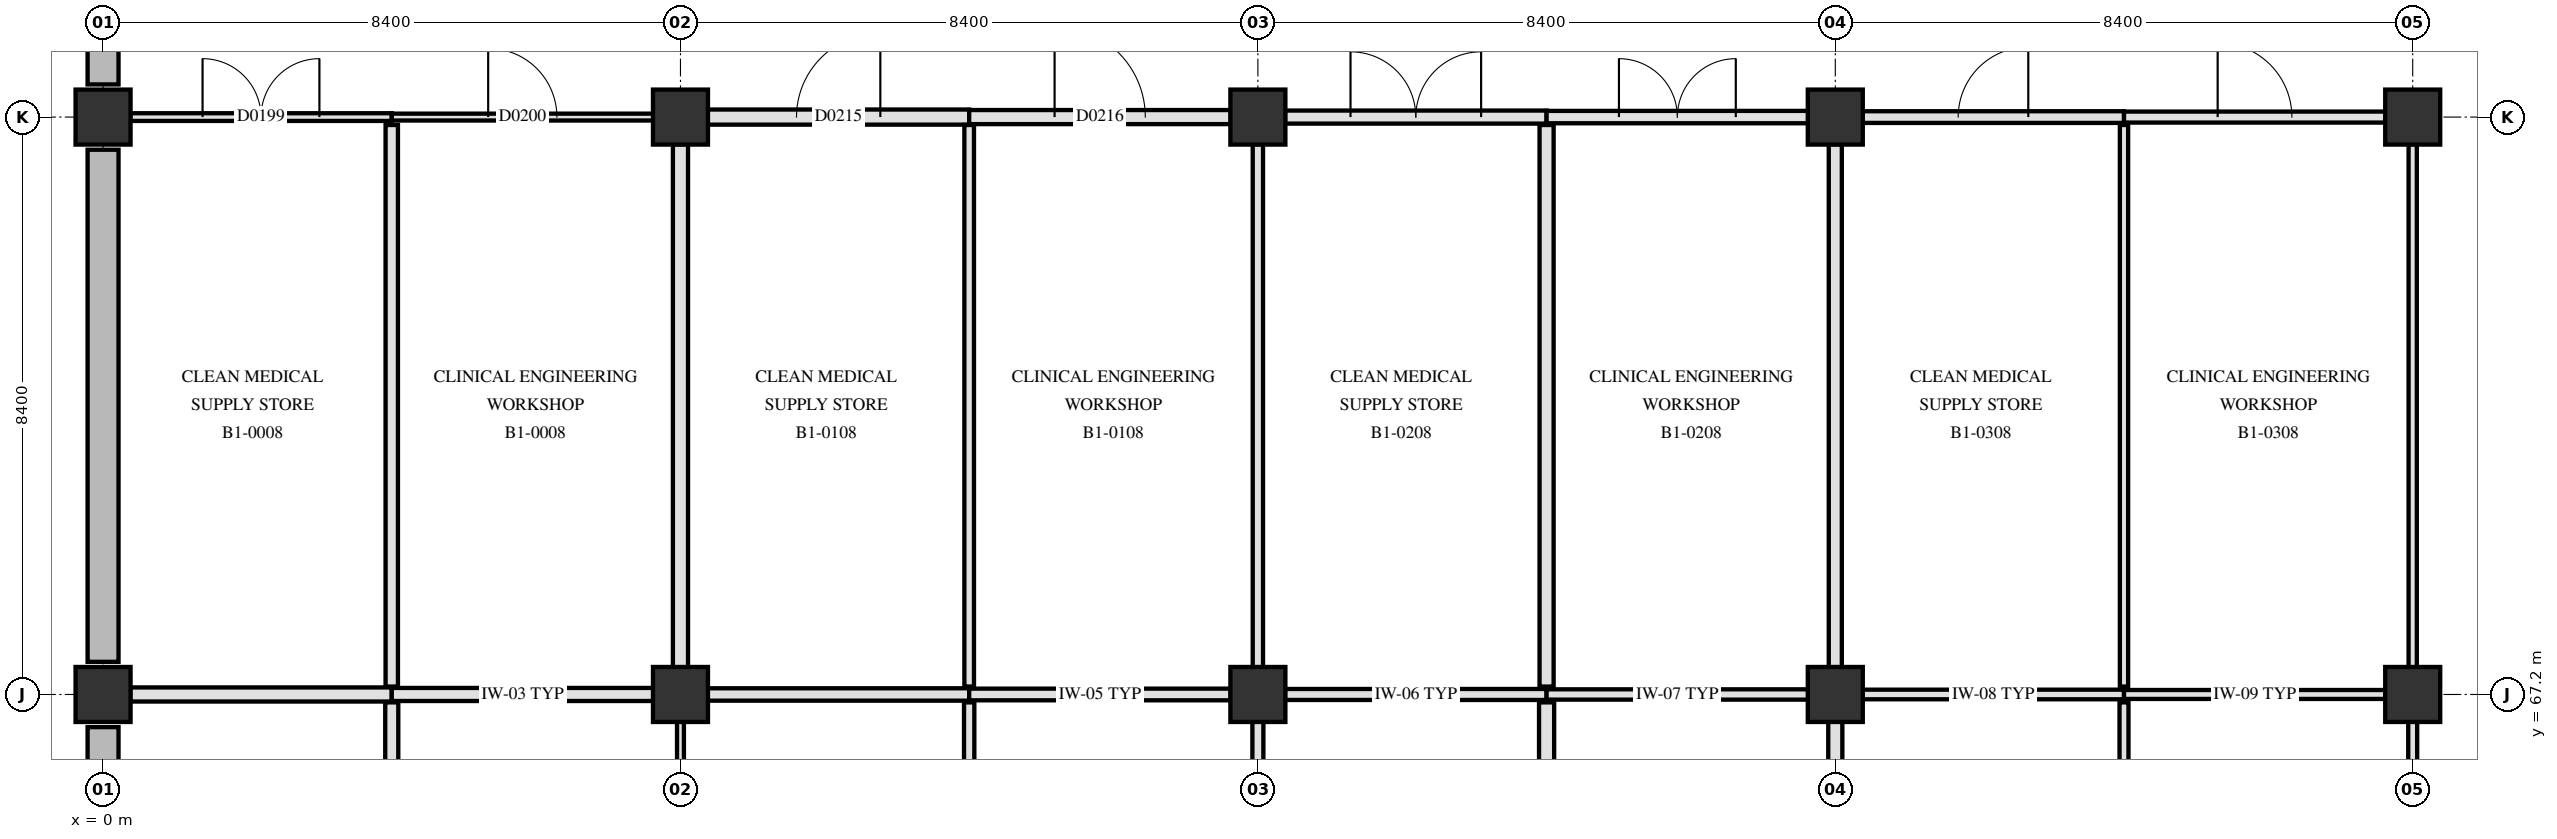
"""IFC4 building model, lengths in metres.
Left out: names, types, materials, properties, quantities, classifications, styles, units other than length and angle.
Written with IfcOpenShell. Run it as: python <this file> out.ifc"""

import sys

from ifc_helpers import new_model, si_unit, direction, frame, frame_2d, origin, origin_2d, place, context, subcontext, project, spatial, rectangle, extrude, element, fill, save


model = new_model("IFC4")
c1 = context("Model", 3, precision=1e-05, world=origin(), true_north=direction((0.0, 1.0)))
c2 = subcontext(c1, "Body", "Model", "MODEL_VIEW")
j1 = project(units=[si_unit("LENGTHUNIT", "METRE"), si_unit("PLANEANGLEUNIT", "RADIAN")], contexts=[c1])
p1 = place(None, origin())
s1 = spatial("IfcSite", under=j1, at=p1, CompositionType="ELEMENT")
p2 = place(p1, origin())
s2 = spatial("IfcBuilding", under=s1, at=p2, CompositionType="ELEMENT")
p3 = place(p2, frame((0.0, 0.0, -5.4)))
s3 = spatial("IfcBuildingStorey", under=s2, at=p3, CompositionType="ELEMENT", Elevation=-5.4)
for number, where, z_axis, x_axis in (
    (1, (0.0, 67.2, 0.0), (0.0, 0.0, 1.0), (1.0, 0.0, 0.0)),
    (2, (0.0, 75.6, 0.0), (0.0, 0.0, 1.0), (1.0, 0.0, 0.0)),
    (3, (8.4, 67.2, 0.0), (0.0, 0.0, 1.0), (1.0, 0.0, 0.0)),
    (4, (8.4, 75.6, 0.0), (0.0, 0.0, 1.0), (1.0, 0.0, 0.0)),
    (5, (16.8, 67.2, 0.0), (0.0, 0.0, 1.0), (1.0, 0.0, 0.0)),
    (6, (16.8, 75.6, 0.0), (0.0, 0.0, 1.0), (1.0, 0.0, 0.0)),
    (7, (25.2, 67.2, 0.0), (0.0, 0.0, 1.0), (1.0, 0.0, 0.0)),
    (8, (25.2, 75.6, 0.0), (0.0, 0.0, 1.0), (1.0, 0.0, 0.0)),
    (9, (33.6, 67.2, 0.0), (0.0, 0.0, 1.0), (1.0, 0.0, 0.0)),
    (10, (33.6, 75.6, 0.0), (0.0, 0.0, 1.0), (1.0, 0.0, 0.0)),
):
    element("IfcColumn", number, at=place(p3, frame(where, z_axis=z_axis, x_axis=x_axis)), inside=s3, PredefinedType="COLUMN", context=c2, shape_type="SweptSolid", body=[
        extrude(rectangle(XDim=0.8, YDim=0.8, at=origin_2d()), origin(), (0.0, 0.0, 1.0), 5.4),
    ])
p4 = place(p3, frame((0.0, 59.275, 0.0), z_axis=(0.0, 0.0, 1.0), x_axis=(0.0, 1.0, 0.0)))
e11 = element("IfcWall", 11, at=p4, inside=s3, PredefinedType="SOLIDWALL", context=c2, shape_type="SweptSolid", body=[
    extrude(rectangle(XDim=7.45, YDim=0.45, at=frame_2d((3.725, 0.0))), origin(), (0.0, 0.0, 1.0), 5.08),
])
for number, where, z_axis, x_axis in (
    (12, (0.0, 67.675, 0.0), (0.0, 0.0, 1.0), (0.0, 1.0, 0.0)),
    (13, (0.0, 76.075, 0.0), (0.0, 0.0, 1.0), (0.0, 1.0, 0.0)),
):
    element("IfcWall", number, at=place(p3, frame(where, z_axis=z_axis, x_axis=x_axis)), inside=s3, PredefinedType="SOLIDWALL", context=c2, shape_type="SweptSolid", body=[
        extrude(rectangle(XDim=7.45, YDim=0.45, at=frame_2d((3.725, 0.0))), origin(), (0.0, 0.0, 1.0), 5.08),
    ])
p5 = place(p3, frame((0.395, 67.2, 0.0), z_axis=(0.0, 0.0, 1.0), x_axis=(1.0, 0.0, 0.0)))
e14 = element("IfcWall", 14, at=p5, inside=s3, PredefinedType="PARTITIONING", context=c2, shape_type="SweptSolid", body=[
    extrude(rectangle(XDim=3.805, YDim=0.205, at=frame_2d((1.902, 0.0))), origin(), (0.0, 0.0, 1.0), 4.42),
])
p6 = place(p3, frame((4.2, 67.2, 0.0), z_axis=(0.0, 0.0, 1.0), x_axis=(1.0, 0.0, 0.0)))
e15 = element("IfcWall", 15, at=p6, inside=s3, PredefinedType="PARTITIONING", context=c2, shape_type="SweptSolid", body=[
    extrude(rectangle(XDim=3.805, YDim=0.19, at=frame_2d((1.902, 0.0))), origin(), (0.0, 0.0, 1.0), 4.42),
])
p7 = place(p3, frame((8.795, 67.2, 0.0), z_axis=(0.0, 0.0, 1.0), x_axis=(1.0, 0.0, 0.0)))
e16 = element("IfcWall", 16, at=p7, inside=s3, PredefinedType="PARTITIONING", context=c2, shape_type="SweptSolid", body=[
    extrude(rectangle(XDim=3.805, YDim=0.18, at=frame_2d((1.903, 0.0))), origin(), (0.0, 0.0, 1.0), 4.42),
])
p8 = place(p3, frame((12.6, 67.2, 0.0), z_axis=(0.0, 0.0, 1.0), x_axis=(1.0, 0.0, 0.0)))
e17 = element("IfcWall", 17, at=p8, inside=s3, PredefinedType="PARTITIONING", context=c2, shape_type="SweptSolid", body=[
    extrude(rectangle(XDim=3.805, YDim=0.17, at=frame_2d((1.902, 0.0))), origin(), (0.0, 0.0, 1.0), 4.42),
])
p9 = place(p3, frame((17.195, 67.2, 0.0), z_axis=(0.0, 0.0, 1.0), x_axis=(1.0, 0.0, 0.0)))
e18 = element("IfcWall", 18, at=p9, inside=s3, PredefinedType="PARTITIONING", context=c2, shape_type="SweptSolid", body=[
    extrude(rectangle(XDim=3.805, YDim=0.16, at=frame_2d((1.902, 0.0))), origin(), (0.0, 0.0, 1.0), 4.42),
])
p10 = place(p3, frame((21.0, 67.2, 0.0), z_axis=(0.0, 0.0, 1.0), x_axis=(1.0, 0.0, 0.0)))
e19 = element("IfcWall", 19, at=p10, inside=s3, PredefinedType="PARTITIONING", context=c2, shape_type="SweptSolid", body=[
    extrude(rectangle(XDim=3.805, YDim=0.15, at=frame_2d((1.902, 0.0))), origin(), (0.0, 0.0, 1.0), 4.42),
])
p11 = place(p3, frame((25.595, 67.2, 0.0), z_axis=(0.0, 0.0, 1.0), x_axis=(1.0, 0.0, 0.0)))
e20 = element("IfcWall", 20, at=p11, inside=s3, PredefinedType="PARTITIONING", context=c2, shape_type="SweptSolid", body=[
    extrude(rectangle(XDim=3.805, YDim=0.14, at=frame_2d((1.902, 0.0))), origin(), (0.0, 0.0, 1.0), 4.42),
])
p12 = place(p3, frame((29.4, 67.2, 0.0), z_axis=(0.0, 0.0, 1.0), x_axis=(1.0, 0.0, 0.0)))
e21 = element("IfcWall", 21, at=p12, inside=s3, PredefinedType="PARTITIONING", context=c2, shape_type="SweptSolid", body=[
    extrude(rectangle(XDim=3.805, YDim=0.13, at=frame_2d((1.903, 0.0))), origin(), (0.0, 0.0, 1.0), 4.42),
])
p13 = place(p3, frame((0.395, 75.6, 0.0), z_axis=(0.0, 0.0, 1.0), x_axis=(1.0, 0.0, 0.0)))
e22 = element("IfcWall", 22, at=p13, inside=s3, PredefinedType="PARTITIONING", context=c2, shape_type="SweptSolid", body=[
    extrude(rectangle(XDim=3.805, YDim=0.112, at=frame_2d((1.902, 0.0))), origin(), (0.0, 0.0, 1.0), 4.42),
])
p14 = place(p13, frame((1.052, 0.0, 0.0)))
e23 = element("IfcOpeningElement", 23, at=p14, cuts=e22, PredefinedType="OPENING", context=c2, shape_type="SweptSolid", body=[
    extrude(rectangle(XDim=1.7, YDim=2.25, at=frame_2d((0.85, 1.125))), frame((0.0, 0.066, 0.0), z_axis=(0.0, -1.0, 0.0), x_axis=(1.0, 0.0, 0.0)), (0.0, 0.0, 1.0), 0.132),
])
p15 = place(p3, frame((4.2, 75.6, 0.0), z_axis=(0.0, 0.0, 1.0), x_axis=(1.0, 0.0, 0.0)))
e24 = element("IfcWall", 24, at=p15, inside=s3, PredefinedType="PARTITIONING", context=c2, shape_type="SweptSolid", body=[
    extrude(rectangle(XDim=3.805, YDim=0.1, at=frame_2d((1.902, 0.0))), origin(), (0.0, 0.0, 1.0), 4.42),
])
p16 = place(p15, frame((1.403, 0.0, 0.0)))
e25 = element("IfcOpeningElement", 25, at=p16, cuts=e24, PredefinedType="OPENING", context=c2, shape_type="SweptSolid", body=[
    extrude(rectangle(XDim=1.0, YDim=2.15, at=frame_2d((0.5, 1.075))), frame((0.0, 0.06, 0.0), z_axis=(0.0, -1.0, 0.0), x_axis=(1.0, 0.0, 0.0)), (0.0, 0.0, 1.0), 0.12),
])
p17 = place(p3, frame((8.795, 75.6, 0.0), z_axis=(0.0, 0.0, 1.0), x_axis=(1.0, 0.0, 0.0)))
e26 = element("IfcWall", 26, at=p17, inside=s3, PredefinedType="PARTITIONING", context=c2, shape_type="SweptSolid", body=[
    extrude(rectangle(XDim=3.805, YDim=0.22, at=frame_2d((1.903, 0.0))), origin(), (0.0, 0.0, 1.0), 4.42),
])
p18 = place(p17, frame((1.292, 0.0, 0.0)))
e27 = element("IfcOpeningElement", 27, at=p18, cuts=e26, PredefinedType="OPENING", context=c2, shape_type="SweptSolid", body=[
    extrude(rectangle(XDim=1.22, YDim=2.18, at=frame_2d((0.61, 1.09))), frame((0.0, 0.12, 0.0), z_axis=(0.0, -1.0, 0.0), x_axis=(1.0, 0.0, 0.0)), (0.0, 0.0, 1.0), 0.24),
])
p19 = place(p3, frame((12.6, 75.6, 0.0), z_axis=(0.0, 0.0, 1.0), x_axis=(1.0, 0.0, 0.0)))
e28 = element("IfcWall", 28, at=p19, inside=s3, PredefinedType="PARTITIONING", context=c2, shape_type="SweptSolid", body=[
    extrude(rectangle(XDim=3.805, YDim=0.205, at=frame_2d((1.902, 0.0))), origin(), (0.0, 0.0, 1.0), 4.42),
])
p20 = place(p19, frame((1.242, 0.0, 0.0)))
e29 = element("IfcOpeningElement", 29, at=p20, cuts=e28, PredefinedType="OPENING", context=c2, shape_type="SweptSolid", body=[
    extrude(rectangle(XDim=1.32, YDim=2.18, at=frame_2d((0.66, 1.09))), frame((0.0, 0.113, 0.0), z_axis=(0.0, -1.0, 0.0), x_axis=(1.0, 0.0, 0.0)), (0.0, 0.0, 1.0), 0.225),
])
p21 = place(p3, frame((17.195, 75.6, 0.0), z_axis=(0.0, 0.0, 1.0), x_axis=(1.0, 0.0, 0.0)))
e30 = element("IfcWall", 30, at=p21, inside=s3, PredefinedType="PARTITIONING", context=c2, shape_type="SweptSolid", body=[
    extrude(rectangle(XDim=3.805, YDim=0.19, at=frame_2d((1.902, 0.0))), origin(), (0.0, 0.0, 1.0), 4.42),
])
p22 = place(p21, frame((0.952, 0.0, 0.0)))
e31 = element("IfcOpeningElement", 31, at=p22, cuts=e30, PredefinedType="OPENING", context=c2, shape_type="SweptSolid", body=[
    extrude(rectangle(XDim=1.9, YDim=2.3, at=frame_2d((0.95, 1.15))), frame((0.0, 0.105, 0.0), z_axis=(0.0, -1.0, 0.0), x_axis=(1.0, 0.0, 0.0)), (0.0, 0.0, 1.0), 0.21),
])
p23 = place(p3, frame((21.0, 75.6, 0.0), z_axis=(0.0, 0.0, 1.0), x_axis=(1.0, 0.0, 0.0)))
e32 = element("IfcWall", 32, at=p23, inside=s3, PredefinedType="PARTITIONING", context=c2, shape_type="SweptSolid", body=[
    extrude(rectangle(XDim=3.805, YDim=0.18, at=frame_2d((1.902, 0.0))), origin(), (0.0, 0.0, 1.0), 4.42),
])
p24 = place(p23, frame((1.052, 0.0, 0.0)))
e33 = element("IfcOpeningElement", 33, at=p24, cuts=e32, PredefinedType="OPENING", context=c2, shape_type="SweptSolid", body=[
    extrude(rectangle(XDim=1.7, YDim=2.25, at=frame_2d((0.85, 1.125))), frame((0.0, 0.1, 0.0), z_axis=(0.0, -1.0, 0.0), x_axis=(1.0, 0.0, 0.0)), (0.0, 0.0, 1.0), 0.2),
])
p25 = place(p3, frame((25.595, 75.6, 0.0), z_axis=(0.0, 0.0, 1.0), x_axis=(1.0, 0.0, 0.0)))
e34 = element("IfcWall", 34, at=p25, inside=s3, PredefinedType="PARTITIONING", context=c2, shape_type="SweptSolid", body=[
    extrude(rectangle(XDim=3.805, YDim=0.17, at=frame_2d((1.902, 0.0))), origin(), (0.0, 0.0, 1.0), 4.42),
])
p26 = place(p25, frame((1.393, 0.0, 0.0)))
e35 = element("IfcOpeningElement", 35, at=p26, cuts=e34, PredefinedType="OPENING", context=c2, shape_type="SweptSolid", body=[
    extrude(rectangle(XDim=1.02, YDim=2.12, at=frame_2d((0.51, 1.06))), frame((0.0, 0.095, 0.0), z_axis=(0.0, -1.0, 0.0), x_axis=(1.0, 0.0, 0.0)), (0.0, 0.0, 1.0), 0.19),
])
p27 = place(p3, frame((29.4, 75.6, 0.0), z_axis=(0.0, 0.0, 1.0), x_axis=(1.0, 0.0, 0.0)))
e36 = element("IfcWall", 36, at=p27, inside=s3, PredefinedType="PARTITIONING", context=c2, shape_type="SweptSolid", body=[
    extrude(rectangle(XDim=3.805, YDim=0.16, at=frame_2d((1.903, 0.0))), origin(), (0.0, 0.0, 1.0), 4.42),
])
p28 = place(p27, frame((1.363, 0.0, 0.0)))
e37 = element("IfcOpeningElement", 37, at=p28, cuts=e36, PredefinedType="OPENING", context=c2, shape_type="SweptSolid", body=[
    extrude(rectangle(XDim=1.08, YDim=2.12, at=frame_2d((0.54, 1.06))), frame((0.0, 0.09, 0.0), z_axis=(0.0, -1.0, 0.0), x_axis=(1.0, 0.0, 0.0)), (0.0, 0.0, 1.0), 0.18),
])
p29 = place(p3, frame((4.2, 61.515, 0.0), z_axis=(0.0, 0.0, 1.0), x_axis=(0.0, 1.0, 0.0)))
e38 = element("IfcWall", 38, at=p29, inside=s3, PredefinedType="PARTITIONING", context=c2, shape_type="SweptSolid", body=[
    extrude(rectangle(XDim=5.57, YDim=0.19, at=frame_2d((2.785, 0.0))), origin(), (0.0, 0.0, 1.0), 4.42),
])
p30 = place(p3, frame((4.2, 67.315, 0.0), z_axis=(0.0, 0.0, 1.0), x_axis=(0.0, 1.0, 0.0)))
e39 = element("IfcWall", 39, at=p30, inside=s3, PredefinedType="PARTITIONING", context=c2, shape_type="SweptSolid", body=[
    extrude(rectangle(XDim=8.17, YDim=0.18, at=frame_2d((4.085, 0.0))), origin(), (0.0, 0.0, 1.0), 4.42),
])
p31 = place(p3, frame((8.4, 61.515, 0.0), z_axis=(0.0, 0.0, 1.0), x_axis=(0.0, 1.0, 0.0)))
e40 = element("IfcWall", 40, at=p31, inside=s3, PredefinedType="PARTITIONING", context=c2, shape_type="SweptSolid", body=[
    extrude(rectangle(XDim=5.29, YDim=0.1, at=frame_2d((2.645, 0.0))), origin(), (0.0, 0.0, 1.0), 4.47),
])
p32 = place(p3, frame((8.4, 67.595, 0.0), z_axis=(0.0, 0.0, 1.0), x_axis=(0.0, 1.0, 0.0)))
e41 = element("IfcWall", 41, at=p32, inside=s3, PredefinedType="PARTITIONING", context=c2, shape_type="SweptSolid", body=[
    extrude(rectangle(XDim=7.61, YDim=0.22, at=frame_2d((3.805, 0.0))), origin(), (0.0, 0.0, 1.0), 4.47),
])
p33 = place(p3, frame((12.6, 61.515, 0.0), z_axis=(0.0, 0.0, 1.0), x_axis=(0.0, 1.0, 0.0)))
e42 = element("IfcWall", 42, at=p33, inside=s3, PredefinedType="PARTITIONING", context=c2, shape_type="SweptSolid", body=[
    extrude(rectangle(XDim=5.57, YDim=0.15, at=frame_2d((2.785, 0.0))), origin(), (0.0, 0.0, 1.0), 4.42),
])
p34 = place(p3, frame((12.6, 67.315, 0.0), z_axis=(0.0, 0.0, 1.0), x_axis=(0.0, 1.0, 0.0)))
e43 = element("IfcWall", 43, at=p34, inside=s3, PredefinedType="PARTITIONING", context=c2, shape_type="SweptSolid", body=[
    extrude(rectangle(XDim=8.17, YDim=0.14, at=frame_2d((4.085, 0.0))), origin(), (0.0, 0.0, 1.0), 4.42),
])
p35 = place(p3, frame((16.8, 61.515, 0.0), z_axis=(0.0, 0.0, 1.0), x_axis=(0.0, 1.0, 0.0)))
e44 = element("IfcWall", 44, at=p35, inside=s3, PredefinedType="PARTITIONING", context=c2, shape_type="SweptSolid", body=[
    extrude(rectangle(XDim=5.29, YDim=0.16, at=frame_2d((2.645, 0.0))), origin(), (0.0, 0.0, 1.0), 4.47),
])
p36 = place(p3, frame((16.8, 67.595, 0.0), z_axis=(0.0, 0.0, 1.0), x_axis=(0.0, 1.0, 0.0)))
e45 = element("IfcWall", 45, at=p36, inside=s3, PredefinedType="PARTITIONING", context=c2, shape_type="SweptSolid", body=[
    extrude(rectangle(XDim=7.61, YDim=0.15, at=frame_2d((3.805, 0.0))), origin(), (0.0, 0.0, 1.0), 4.47),
])
p37 = place(p3, frame((21.0, 61.515, 0.0), z_axis=(0.0, 0.0, 1.0), x_axis=(0.0, 1.0, 0.0)))
e46 = element("IfcWall", 46, at=p37, inside=s3, PredefinedType="PARTITIONING", context=c2, shape_type="SweptSolid", body=[
    extrude(rectangle(XDim=5.57, YDim=0.22, at=frame_2d((2.785, 0.0))), origin(), (0.0, 0.0, 1.0), 4.42),
])
p38 = place(p3, frame((21.0, 67.315, 0.0), z_axis=(0.0, 0.0, 1.0), x_axis=(0.0, 1.0, 0.0)))
e47 = element("IfcWall", 47, at=p38, inside=s3, PredefinedType="PARTITIONING", context=c2, shape_type="SweptSolid", body=[
    extrude(rectangle(XDim=8.17, YDim=0.205, at=frame_2d((4.085, 0.0))), origin(), (0.0, 0.0, 1.0), 4.42),
])
p39 = place(p3, frame((25.2, 61.515, 0.0), z_axis=(0.0, 0.0, 1.0), x_axis=(0.0, 1.0, 0.0)))
e48 = element("IfcWall", 48, at=p39, inside=s3, PredefinedType="PARTITIONING", context=c2, shape_type="SweptSolid", body=[
    extrude(rectangle(XDim=5.29, YDim=0.205, at=frame_2d((2.645, 0.0))), origin(), (0.0, 0.0, 1.0), 4.47),
])
p40 = place(p3, frame((25.2, 67.595, 0.0), z_axis=(0.0, 0.0, 1.0), x_axis=(0.0, 1.0, 0.0)))
e49 = element("IfcWall", 49, at=p40, inside=s3, PredefinedType="PARTITIONING", context=c2, shape_type="SweptSolid", body=[
    extrude(rectangle(XDim=7.61, YDim=0.19, at=frame_2d((3.805, 0.0))), origin(), (0.0, 0.0, 1.0), 4.47),
])
p41 = place(p3, frame((29.4, 61.515, 0.0), z_axis=(0.0, 0.0, 1.0), x_axis=(0.0, 1.0, 0.0)))
e50 = element("IfcWall", 50, at=p41, inside=s3, PredefinedType="PARTITIONING", context=c2, shape_type="SweptSolid", body=[
    extrude(rectangle(XDim=5.57, YDim=0.13, at=frame_2d((2.785, 0.0))), origin(), (0.0, 0.0, 1.0), 4.42),
])
p42 = place(p3, frame((29.4, 67.315, 0.0), z_axis=(0.0, 0.0, 1.0), x_axis=(0.0, 1.0, 0.0)))
e51 = element("IfcWall", 51, at=p42, inside=s3, PredefinedType="PARTITIONING", context=c2, shape_type="SweptSolid", body=[
    extrude(rectangle(XDim=8.17, YDim=0.12, at=frame_2d((4.085, 0.0))), origin(), (0.0, 0.0, 1.0), 4.42),
])
p43 = place(p3, frame((33.6, 61.515, 0.0), z_axis=(0.0, 0.0, 1.0), x_axis=(0.0, 1.0, 0.0)))
e52 = element("IfcWall", 52, at=p43, inside=s3, PredefinedType="PARTITIONING", context=c2, shape_type="SweptSolid", body=[
    extrude(rectangle(XDim=5.29, YDim=0.13, at=frame_2d((2.645, 0.0))), origin(), (0.0, 0.0, 1.0), 4.47),
])
p44 = place(p3, frame((33.6, 67.595, 0.0), z_axis=(0.0, 0.0, 1.0), x_axis=(0.0, 1.0, 0.0)))
e53 = element("IfcWall", 53, at=p44, inside=s3, PredefinedType="PARTITIONING", context=c2, shape_type="SweptSolid", body=[
    extrude(rectangle(XDim=7.61, YDim=0.12, at=frame_2d((3.805, 0.0))), origin(), (0.0, 0.0, 1.0), 4.47),
])
p45 = place(p14, origin())
e54 = element("IfcDoor", 54, at=p45, inside=s3, OperationType="DOUBLE_SWING_RIGHT", PredefinedType="DOOR", context=c2, shape_type="SweptSolid", body=[
    extrude(rectangle(XDim=1.7, YDim=2.25, at=frame_2d((0.85, 1.125))), frame((0.0, 0.025, 0.0), z_axis=(0.0, -1.0, 0.0), x_axis=(1.0, 0.0, 0.0)), (0.0, 0.0, 1.0), 0.05),
])
fill(e23, e54)
p46 = place(p16, origin())
e55 = element("IfcDoor", 55, at=p46, inside=s3, OperationType="SINGLE_SWING_LEFT", PredefinedType="DOOR", context=c2, shape_type="SweptSolid", body=[
    extrude(rectangle(XDim=1.0, YDim=2.15, at=frame_2d((0.5, 1.075))), frame((0.0, 0.025, 0.0), z_axis=(0.0, -1.0, 0.0), x_axis=(1.0, 0.0, 0.0)), (0.0, 0.0, 1.0), 0.05),
])
fill(e25, e55)
p47 = place(p18, origin())
e56 = element("IfcDoor", 56, at=p47, inside=s3, OperationType="SINGLE_SWING_RIGHT", PredefinedType="DOOR", context=c2, shape_type="SweptSolid", body=[
    extrude(rectangle(XDim=1.22, YDim=2.18, at=frame_2d((0.61, 1.09))), frame((0.0, 0.025, 0.0), z_axis=(0.0, -1.0, 0.0), x_axis=(1.0, 0.0, 0.0)), (0.0, 0.0, 1.0), 0.05),
])
fill(e27, e56)
p48 = place(p20, origin())
e57 = element("IfcDoor", 57, at=p48, inside=s3, OperationType="SINGLE_SWING_LEFT", PredefinedType="DOOR", context=c2, shape_type="SweptSolid", body=[
    extrude(rectangle(XDim=1.32, YDim=2.18, at=frame_2d((0.66, 1.09))), frame((0.0, 0.025, 0.0), z_axis=(0.0, -1.0, 0.0), x_axis=(1.0, 0.0, 0.0)), (0.0, 0.0, 1.0), 0.05),
])
fill(e29, e57)
p49 = place(p22, origin())
e58 = element("IfcDoor", 58, at=p49, inside=s3, OperationType="DOUBLE_SWING_LEFT", PredefinedType="DOOR", context=c2, shape_type="SweptSolid", body=[
    extrude(rectangle(XDim=1.9, YDim=2.3, at=frame_2d((0.95, 1.15))), frame((0.0, 0.025, 0.0), z_axis=(0.0, -1.0, 0.0), x_axis=(1.0, 0.0, 0.0)), (0.0, 0.0, 1.0), 0.05),
])
fill(e31, e58)
p50 = place(p24, origin())
e59 = element("IfcDoor", 59, at=p50, inside=s3, OperationType="DOUBLE_SWING_RIGHT", PredefinedType="DOOR", context=c2, shape_type="SweptSolid", body=[
    extrude(rectangle(XDim=1.7, YDim=2.25, at=frame_2d((0.85, 1.125))), frame((0.0, 0.025, 0.0), z_axis=(0.0, -1.0, 0.0), x_axis=(1.0, 0.0, 0.0)), (0.0, 0.0, 1.0), 0.05),
])
fill(e33, e59)
p51 = place(p26, origin())
e60 = element("IfcDoor", 60, at=p51, inside=s3, OperationType="SINGLE_SWING_RIGHT", PredefinedType="DOOR", context=c2, shape_type="SweptSolid", body=[
    extrude(rectangle(XDim=1.02, YDim=2.12, at=frame_2d((0.51, 1.06))), frame((0.0, 0.025, 0.0), z_axis=(0.0, -1.0, 0.0), x_axis=(1.0, 0.0, 0.0)), (0.0, 0.0, 1.0), 0.05),
])
fill(e35, e60)
p52 = place(p28, origin())
e61 = element("IfcDoor", 61, at=p52, inside=s3, OperationType="SINGLE_SWING_LEFT", PredefinedType="DOOR", context=c2, shape_type="SweptSolid", body=[
    extrude(rectangle(XDim=1.08, YDim=2.12, at=frame_2d((0.54, 1.06))), frame((0.0, 0.025, 0.0), z_axis=(0.0, -1.0, 0.0), x_axis=(1.0, 0.0, 0.0)), (0.0, 0.0, 1.0), 0.05),
])
fill(e37, e61)
save(model, sys.argv[1])
